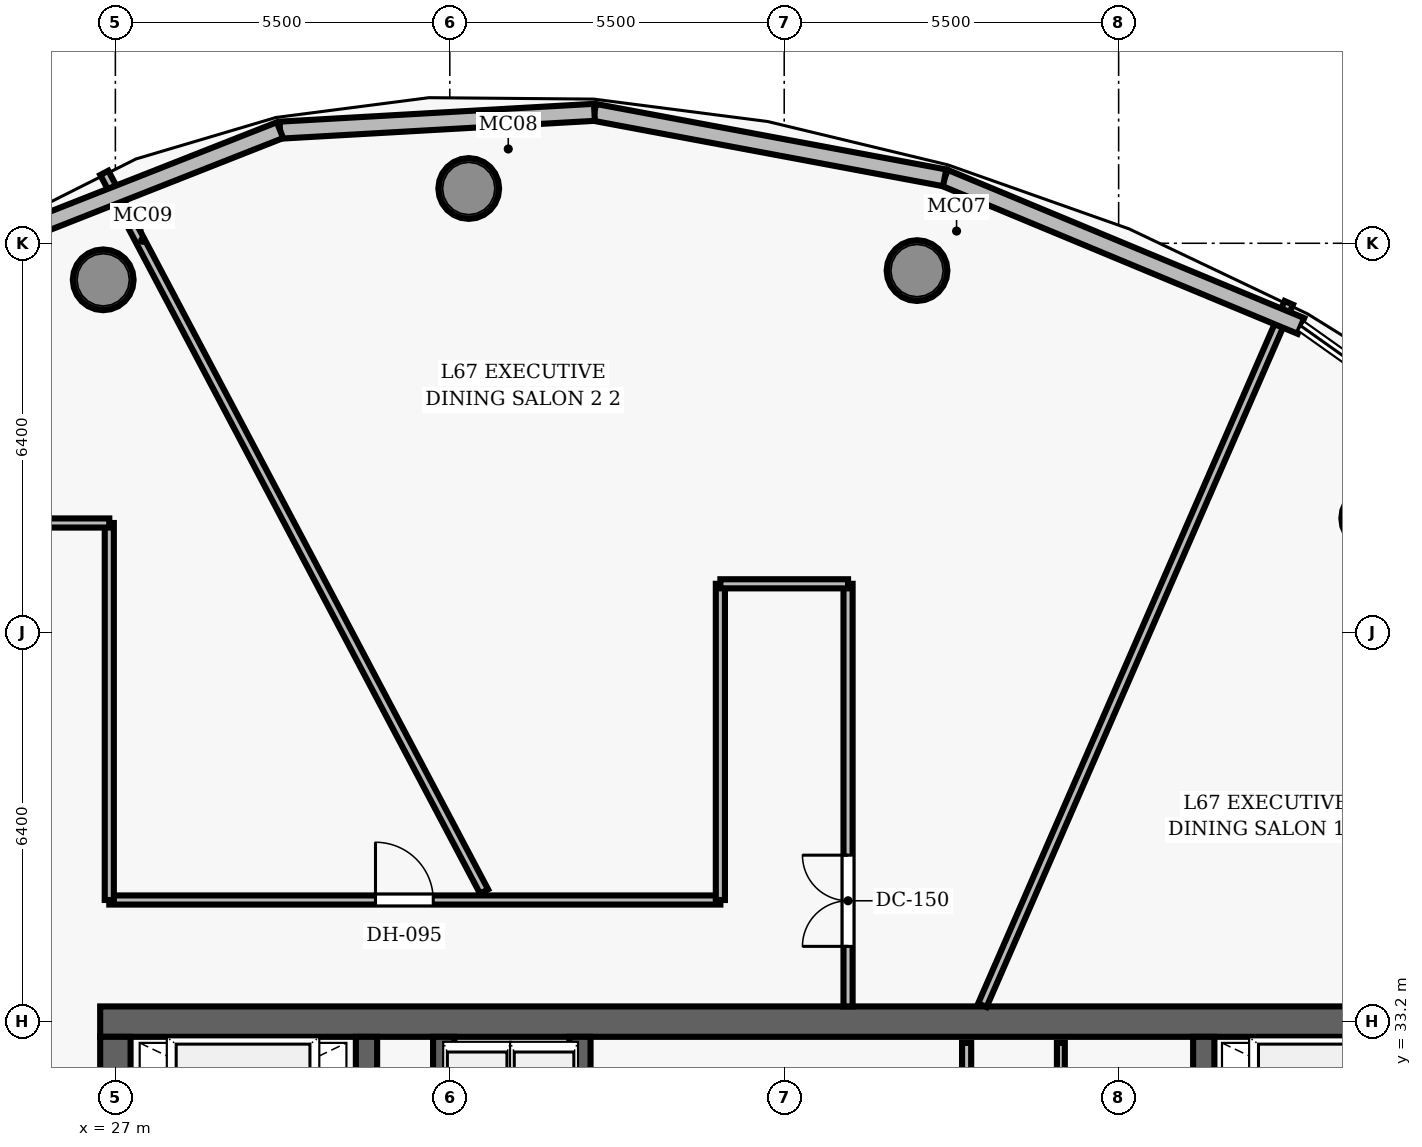
"""IFC4 building model, lengths in metres.
Left out: names, types, materials, properties, quantities, classifications, styles, units other than length and angle.
Written with IfcOpenShell. Run it as: python <this file> out.ifc"""

import sys

from ifc_helpers import new_model, si_unit, direction, frame, frame_2d, origin, origin_2d, place, context, subcontext, project, spatial, rectangle, hollow_circle, extrude, element, fill, save


model = new_model("IFC4")
c1 = context("Model", 3, precision=1e-05, world=origin(), true_north=direction((0.0, 1.0)))
c2 = subcontext(c1, "Body", "Model", "MODEL_VIEW")
j1 = project(units=[si_unit("LENGTHUNIT", "METRE"), si_unit("PLANEANGLEUNIT", "RADIAN")], contexts=[c1])
p1 = place(None, origin())
s1 = spatial("IfcSite", under=j1, at=p1, CompositionType="ELEMENT")
p2 = place(p1, origin())
s2 = spatial("IfcBuilding", under=s1, at=p2, CompositionType="ELEMENT")
p3 = place(p2, frame((0.0, 0.0, 265.15)))
s3 = spatial("IfcBuildingStorey", under=s2, at=p3, CompositionType="ELEMENT", Elevation=265.15)
p4 = place(p3, frame((26.75, 33.2, 0.0), z_axis=(0.0, 0.0, 1.0), x_axis=(1.0, 0.0, 0.0)))
e1 = element("IfcWall", 1, at=p4, inside=s3, PredefinedType="SHEAR", context=c2, shape_type="SweptSolid", body=[
    extrude(rectangle(XDim=22.5, YDim=0.5, at=frame_2d((11.25, 0.0))), origin(), (0.0, 0.0, 1.0), 3.85),
])
p5 = place(p3, frame((27.0, 19.05, 0.0), z_axis=(0.0, 0.0, 1.0), x_axis=(0.0, 1.0, 0.0)))
e2 = element("IfcWall", 2, at=p5, inside=s3, PredefinedType="SHEAR", context=c2, shape_type="SweptSolid", body=[
    extrude(rectangle(XDim=13.9, YDim=0.5, at=frame_2d((6.95, 0.0))), origin(), (0.0, 0.0, 1.0), 3.85),
])
p6 = place(p5, frame((8.2, 0.0, 0.0)))
e3 = element("IfcOpeningElement", 3, at=p6, cuts=e2, PredefinedType="OPENING", context=c2, shape_type="SweptSolid", body=[
    extrude(rectangle(XDim=1.05, YDim=2.15, at=frame_2d((0.525, 1.075))), frame((0.0, 0.26, 0.0), z_axis=(0.0, -1.0, 0.0), x_axis=(1.0, 0.0, 0.0)), (0.0, 0.0, 1.0), 0.52),
])
for number, where, z_axis, x_axis in (
    (4, (31.13, 19.05, 0.0), (0.0, 0.0, 1.0), (0.0, 1.0, 0.0)),
    (5, (44.9, 19.05, 0.0), (0.0, 0.0, 1.0), (0.0, 1.0, 0.0)),
):
    element("IfcWall", number, at=place(p3, frame(where, z_axis=z_axis, x_axis=x_axis)), inside=s3, PredefinedType="SHEAR", context=c2, shape_type="SweptSolid", body=[
        extrude(rectangle(XDim=13.9, YDim=0.35, at=frame_2d((6.95, 0.0))), origin(), (0.0, 0.0, 1.0), 3.85),
    ])
for number, where, z_axis, x_axis in (
    (6, (47.662, 41.477, 0.0), (0.0, 0.0, 1.0), (1.0, 0.0, 0.0)),
    (7, (40.185, 45.551, 0.0), (0.0, 0.0, 1.0), (1.0, 0.0, 0.0)),
    (8, (32.812, 46.901, 0.0), (0.0, 0.0, 1.0), (1.0, 0.0, 0.0)),
    (9, (26.8, 45.399, 0.0), (0.0, 0.0, 1.0), (1.0, 0.0, 0.0)),
):
    element("IfcColumn", number, at=place(p3, frame(where, z_axis=z_axis, x_axis=x_axis)), inside=s3, PredefinedType="COLUMN", context=c2, shape_type="SweptSolid", body=[
        extrude(hollow_circle(Radius=0.5, WallThickness=0.045, at=origin_2d()), origin(), (0.0, 0.0, 1.0), 3.85),
    ])
p7 = place(p3, frame((34.64, 26.69, 0.0), z_axis=(0.0, 0.0, 1.0), x_axis=(0.0, 1.0, 0.0)))
e10 = element("IfcWall", 10, at=p7, inside=s3, PredefinedType="SHEAR", context=c2, shape_type="SweptSolid", body=[
    extrude(rectangle(XDim=6.26, YDim=0.35, at=frame_2d((3.13, 0.0))), origin(), (0.0, 0.0, 1.0), 3.85),
])
p8 = place(p7, frame((0.85, 0.0, 0.0)))
e11 = element("IfcOpeningElement", 11, at=p8, cuts=e10, PredefinedType="OPENING", context=c2, shape_type="SweptSolid", body=[
    extrude(rectangle(XDim=1.05, YDim=2.15, at=frame_2d((0.525, 1.075))), frame((0.0, 0.185, 0.0), z_axis=(0.0, -1.0, 0.0), x_axis=(1.0, 0.0, 0.0)), (0.0, 0.0, 1.0), 0.37),
])
p9 = place(p3, frame((32.4, 30.22, 0.0), z_axis=(0.0, 0.0, 1.0), x_axis=(0.0, 1.0, 0.0)))
e12 = element("IfcWall", 12, at=p9, inside=s3, PredefinedType="SHEAR", context=c2, shape_type="SweptSolid", body=[
    extrude(rectangle(XDim=2.73, YDim=0.35, at=frame_2d((1.365, 0.0))), origin(), (0.0, 0.0, 1.0), 3.04),
])
p10 = place(p3, frame((41.0, 28.95, 0.0), z_axis=(0.0, 0.0, 1.0), x_axis=(0.0, 1.0, 0.0)))
e13 = element("IfcWall", 13, at=p10, inside=s3, PredefinedType="PARTITIONING", context=c2, shape_type="SweptSolid", body=[
    extrude(rectangle(XDim=3.9, YDim=0.15, at=frame_2d((1.95, 0.0))), origin(), (0.0, 0.0, 1.0), 3.04),
])
p11 = place(p10, frame((0.7, 0.0, 0.0)))
e14 = element("IfcOpeningElement", 14, at=p11, cuts=e13, PredefinedType="OPENING", context=c2, shape_type="SweptSolid", body=[
    extrude(rectangle(XDim=0.85, YDim=2.1, at=frame_2d((0.425, 1.05))), frame((0.0, 0.085, 0.0), z_axis=(0.0, -1.0, 0.0), x_axis=(1.0, 0.0, 0.0)), (0.0, 0.0, 1.0), 0.17),
])
p12 = place(p3, frame((42.55, 28.1, 0.0), z_axis=(0.0, 0.0, 1.0), x_axis=(0.0, 1.0, 0.0)))
e15 = element("IfcWall", 15, at=p12, inside=s3, PredefinedType="PARTITIONING", context=c2, shape_type="SweptSolid", body=[
    extrude(rectangle(XDim=4.75, YDim=0.13, at=frame_2d((2.375, 0.0))), origin(), (0.0, 0.0, 1.0), 3.04),
])
p13 = place(p12, frame((1.4, 0.0, 0.0)))
e16 = element("IfcOpeningElement", 16, at=p13, cuts=e15, PredefinedType="OPENING", context=c2, shape_type="SweptSolid", body=[
    extrude(rectangle(XDim=0.85, YDim=2.1, at=frame_2d((0.425, 1.05))), frame((0.0, 0.075, 0.0), z_axis=(0.0, -1.0, 0.0), x_axis=(1.0, 0.0, 0.0)), (0.0, 0.0, 1.0), 0.15),
])
p14 = place(p3, frame((26.9, 35.2, 0.0), z_axis=(0.0, 0.0, 1.0), x_axis=(1.0, 0.0, 0.0)))
e17 = element("IfcWall", 17, at=p14, inside=s3, PredefinedType="PARTITIONING", context=c2, shape_type="SweptSolid", body=[
    extrude(rectangle(XDim=10.05, YDim=0.15, at=frame_2d((5.025, 0.0))), origin(), (0.0, 0.0, 1.0), 3.04),
])
p15 = place(p14, frame((4.378, 0.0, 0.0)))
e18 = element("IfcOpeningElement", 18, at=p15, cuts=e17, PredefinedType="OPENING", context=c2, shape_type="SweptSolid", body=[
    extrude(rectangle(XDim=0.95, YDim=2.15, at=frame_2d((0.475, 1.075))), frame((0.0, 0.085, 0.0), z_axis=(0.0, -1.0, 0.0), x_axis=(1.0, 0.0, 0.0)), (0.0, 0.0, 1.0), 0.17),
])
p16 = place(p3, frame((26.9, 35.2, 0.0), z_axis=(0.0, 0.0, 1.0), x_axis=(0.0, 1.0, 0.0)))
e19 = element("IfcWall", 19, at=p16, inside=s3, PredefinedType="PARTITIONING", context=c2, shape_type="SweptSolid", body=[
    extrude(rectangle(XDim=6.2, YDim=0.15, at=frame_2d((3.1, 0.0))), origin(), (0.0, 0.0, 1.0), 3.04),
])
p17 = place(p3, frame((24.8, 41.4, 0.0), z_axis=(0.0, 0.0, 1.0), x_axis=(1.0, 0.0, 0.0)))
e20 = element("IfcWall", 20, at=p17, inside=s3, PredefinedType="PARTITIONING", context=c2, shape_type="SweptSolid", body=[
    extrude(rectangle(XDim=2.1, YDim=0.15, at=frame_2d((1.05, 0.0))), origin(), (0.0, 0.0, 1.0), 3.04),
])
p18 = place(p3, frame((36.95, 35.2, 0.0), z_axis=(0.0, 0.0, 1.0), x_axis=(0.0, 1.0, 0.0)))
e21 = element("IfcWall", 21, at=p18, inside=s3, PredefinedType="PARTITIONING", context=c2, shape_type="SweptSolid", body=[
    extrude(rectangle(XDim=5.2, YDim=0.15, at=frame_2d((2.6, 0.0))), origin(), (0.0, 0.0, 1.0), 3.04),
])
p19 = place(p3, frame((39.05, 33.45, 0.0), z_axis=(0.0, 0.0, 1.0), x_axis=(0.0, 1.0, 0.0)))
e22 = element("IfcWall", 22, at=p19, inside=s3, PredefinedType="PARTITIONING", context=c2, shape_type="SweptSolid", body=[
    extrude(rectangle(XDim=6.95, YDim=0.15, at=frame_2d((3.475, 0.0))), origin(), (0.0, 0.0, 1.0), 3.04),
])
p20 = place(p19, frame((0.988, 0.0, 0.0)))
e23 = element("IfcOpeningElement", 23, at=p20, cuts=e22, PredefinedType="OPENING", context=c2, shape_type="SweptSolid", body=[
    extrude(rectangle(XDim=1.5, YDim=2.2, at=frame_2d((0.75, 1.1))), frame((0.0, 0.085, 0.0), z_axis=(0.0, -1.0, 0.0), x_axis=(1.0, 0.0, 0.0)), (0.0, 0.0, 1.0), 0.17),
])
p21 = place(p3, frame((36.95, 40.4, 0.0), z_axis=(0.0, 0.0, 1.0), x_axis=(1.0, 0.0, 0.0)))
e24 = element("IfcWall", 24, at=p21, inside=s3, PredefinedType="PARTITIONING", context=c2, shape_type="SweptSolid", body=[
    extrude(rectangle(XDim=2.1, YDim=0.15, at=frame_2d((1.05, 0.0))), origin(), (0.0, 0.0, 1.0), 3.04),
])
p22 = place(p3, frame((41.259, 33.47, 0.0), z_axis=(0.0, 0.0, 1.0), x_axis=(0.399905988598, 0.916556163191, 0.0)))
e25 = element("IfcWall", 25, at=p22, inside=s3, PredefinedType="PARTITIONING", context=c2, shape_type="SweptSolid", body=[
    extrude(rectangle(XDim=12.602, YDim=0.15, at=frame_2d((6.301, 0.0))), origin(), (0.0, 0.0, 1.0), 3.04),
])
p23 = place(p3, frame((33.064, 35.34, 0.0), z_axis=(0.0, 0.0, 1.0), x_axis=(-0.467271634446, 0.884113804689, 0.0)))
e26 = element("IfcWall", 26, at=p23, inside=s3, PredefinedType="PARTITIONING", context=c2, shape_type="SweptSolid", body=[
    extrude(rectangle(XDim=13.367, YDim=0.15, at=frame_2d((6.683, 0.0))), origin(), (0.0, 0.0, 1.0), 3.04),
])
p24 = place(p3, frame((40.639, 47.076, 0.0), z_axis=(0.0, 0.0, 1.0), x_axis=(0.92339875501, -0.383842075919, 0.0)))
e27 = element("IfcWall", 27, at=p24, inside=s3, PredefinedType="SOLIDWALL", context=c2, shape_type="SweptSolid", body=[
    extrude(rectangle(XDim=6.345, YDim=0.28, at=frame_2d((3.173, 0.0))), origin(), (0.0, 0.0, 1.0), 3.625),
])
p25 = place(p3, frame((34.879, 48.154, 0.0), z_axis=(0.0, 0.0, 1.0), x_axis=(0.982954154171, -0.183850838449, 0.0)))
e28 = element("IfcWall", 28, at=p25, inside=s3, PredefinedType="SOLIDWALL", context=c2, shape_type="SweptSolid", body=[
    extrude(rectangle(XDim=5.86, YDim=0.28, at=frame_2d((2.93, 0.0))), origin(), (0.0, 0.0, 1.0), 3.625),
])
p26 = place(p3, frame((29.708, 47.86, 0.0), z_axis=(0.0, 0.0, 1.0), x_axis=(0.998396170021, 0.056613493871, 0.0)))
e29 = element("IfcWall", 29, at=p26, inside=s3, PredefinedType="SOLIDWALL", context=c2, shape_type="SweptSolid", body=[
    extrude(rectangle(XDim=5.179, YDim=0.28, at=frame_2d((2.59, 0.0))), origin(), (0.0, 0.0, 1.0), 3.625),
])
p27 = place(p3, frame((25.381, 46.156, 0.0), z_axis=(0.0, 0.0, 1.0), x_axis=(0.930386691725, 0.366579600988, 0.0)))
e30 = element("IfcWall", 30, at=p27, inside=s3, PredefinedType="SOLIDWALL", context=c2, shape_type="SweptSolid", body=[
    extrude(rectangle(XDim=4.651, YDim=0.28, at=frame_2d((2.325, 0.0))), origin(), (0.0, 0.0, 1.0), 3.625),
])
p28 = place(p20, origin())
e31 = element("IfcDoor", 31, at=p28, inside=s3, OperationType="DOUBLE_DOOR_SINGLE_SWING", PredefinedType="DOOR", context=c2, shape_type="SweptSolid", body=[
    extrude(rectangle(XDim=1.5, YDim=2.2, at=frame_2d((0.75, 1.1))), frame((0.0, 0.025, 0.0), z_axis=(0.0, -1.0, 0.0), x_axis=(1.0, 0.0, 0.0)), (0.0, 0.0, 1.0), 0.05),
])
fill(e23, e31)
p29 = place(p15, origin())
e32 = element("IfcDoor", 32, at=p29, inside=s3, OperationType="SINGLE_SWING_LEFT", PredefinedType="DOOR", context=c2, shape_type="SweptSolid", body=[
    extrude(rectangle(XDim=0.95, YDim=2.15, at=frame_2d((0.475, 1.075))), frame((0.0, 0.025, 0.0), z_axis=(0.0, -1.0, 0.0), x_axis=(1.0, 0.0, 0.0)), (0.0, 0.0, 1.0), 0.05),
])
fill(e18, e32)
save(model, sys.argv[1])
